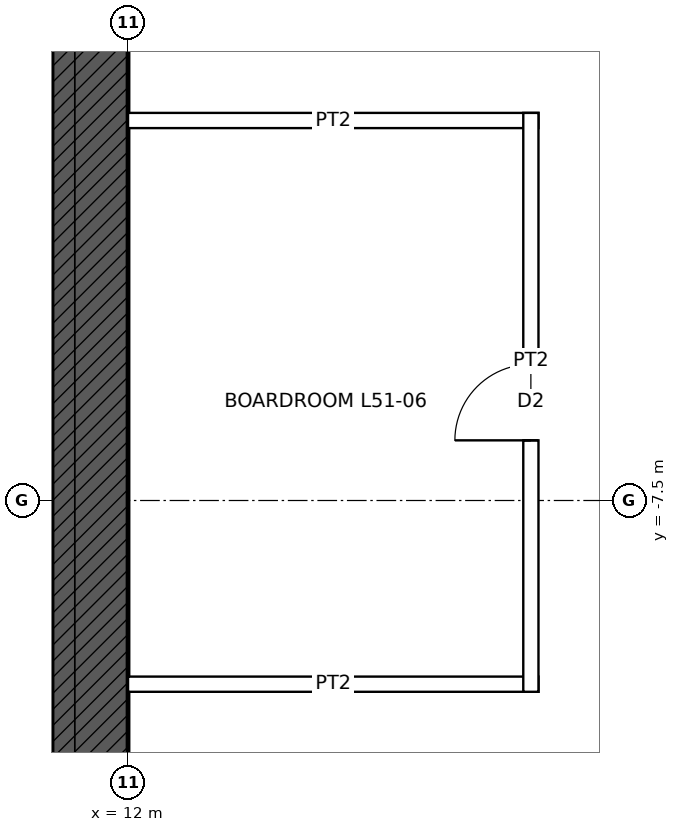
"""IFC4 building model, lengths in metres.
Left out: names, types, materials, properties, quantities, classifications, styles, units other than length and angle.
Written with IfcOpenShell. Run it as: python <this file> out.ifc"""

import sys

from ifc_helpers import new_model, si_unit, direction, frame, frame_2d, origin, place, context, subcontext, project, spatial, rectangle, extrude, element, fill, save


model = new_model("IFC4")
c1 = context("Model", 3, precision=1e-05, world=origin(), true_north=direction((0.0, 1.0)))
c2 = subcontext(c1, "Body", "Model", "MODEL_VIEW")
j1 = project(units=[si_unit("LENGTHUNIT", "METRE"), si_unit("PLANEANGLEUNIT", "RADIAN")], contexts=[c1])
p1 = place(None, origin())
s1 = spatial("IfcSite", under=j1, at=p1, CompositionType="ELEMENT")
p2 = place(p1, origin())
s2 = spatial("IfcBuilding", under=s1, at=p2, CompositionType="ELEMENT")
p3 = place(p2, frame((0.0, 0.0, 237.9)))
s3 = spatial("IfcBuildingStorey", under=s2, at=p3, CompositionType="ELEMENT", Elevation=237.9)
p4 = place(p3, frame((11.5, 11.0, 0.0), z_axis=(0.0, 0.0, 1.0), x_axis=(0.0, -1.0, 0.0)))
e1 = element("IfcWall", 1, at=p4, inside=s3, PredefinedType="SHEAR", context=c2, shape_type="SweptSolid", body=[
    extrude(rectangle(XDim=22.0, YDim=1.0, at=frame_2d((11.0, 0.0))), origin(), (0.0, 0.0, 1.0), 4.0),
])
p5 = place(p4, frame((10.5, 0.0, 0.0)))
e2 = element("IfcOpeningElement", 2, at=p5, cuts=e1, PredefinedType="OPENING", context=c2, shape_type="SweptSolid", body=[
    extrude(rectangle(XDim=1.0, YDim=2.4, at=frame_2d((0.5, 1.2))), frame((0.0, 0.51, 0.0), z_axis=(0.0, -1.0, 0.0), x_axis=(1.0, 0.0, 0.0)), (0.0, 0.0, 1.0), 1.02),
])
for number, where, z_axis, x_axis in (
    (3, (12.0, -9.917, 0.0), (0.0, 0.0, 1.0), (1.0, 0.0, 0.0)),
    (4, (12.0, -2.5, 0.0), (0.0, 0.0, 1.0), (1.0, 0.0, 0.0)),
):
    element("IfcWall", number, at=place(p3, frame(where, z_axis=z_axis, x_axis=x_axis)), inside=s3, PredefinedType="PARTITIONING", context=c2, shape_type="SweptSolid", body=[
        extrude(rectangle(XDim=5.4, YDim=0.2, at=frame_2d((2.7, 0.0))), origin(), (0.0, 0.0, 1.0), 3.85),
    ])
p6 = place(p3, frame((17.3, -10.017, 0.0), z_axis=(0.0, 0.0, 1.0), x_axis=(0.0, 1.0, 0.0)))
e5 = element("IfcWall", 5, at=p6, inside=s3, PredefinedType="PARTITIONING", context=c2, shape_type="SweptSolid", body=[
    extrude(rectangle(XDim=7.617, YDim=0.2, at=frame_2d((3.809, 0.0))), origin(), (0.0, 0.0, 1.0), 3.85),
])
p7 = place(p6, frame((3.309, 0.0, 0.0)))
e6 = element("IfcOpeningElement", 6, at=p7, cuts=e5, PredefinedType="OPENING", context=c2, shape_type="SweptSolid", body=[
    extrude(rectangle(XDim=1.0, YDim=2.1, at=frame_2d((0.5, 1.05))), frame((0.0, 0.11, 0.0), z_axis=(0.0, -1.0, 0.0), x_axis=(1.0, 0.0, 0.0)), (0.0, 0.0, 1.0), 0.22),
])
p8 = place(p7, origin())
e7 = element("IfcDoor", 7, at=p8, inside=s3, OperationType="SINGLE_SWING_LEFT", PredefinedType="DOOR", context=c2, shape_type="SweptSolid", body=[
    extrude(rectangle(XDim=1.0, YDim=2.1, at=frame_2d((0.5, 1.05))), frame((0.0, 0.025, 0.0), z_axis=(0.0, -1.0, 0.0), x_axis=(1.0, 0.0, 0.0)), (0.0, 0.0, 1.0), 0.05),
])
fill(e6, e7)
save(model, sys.argv[1])
